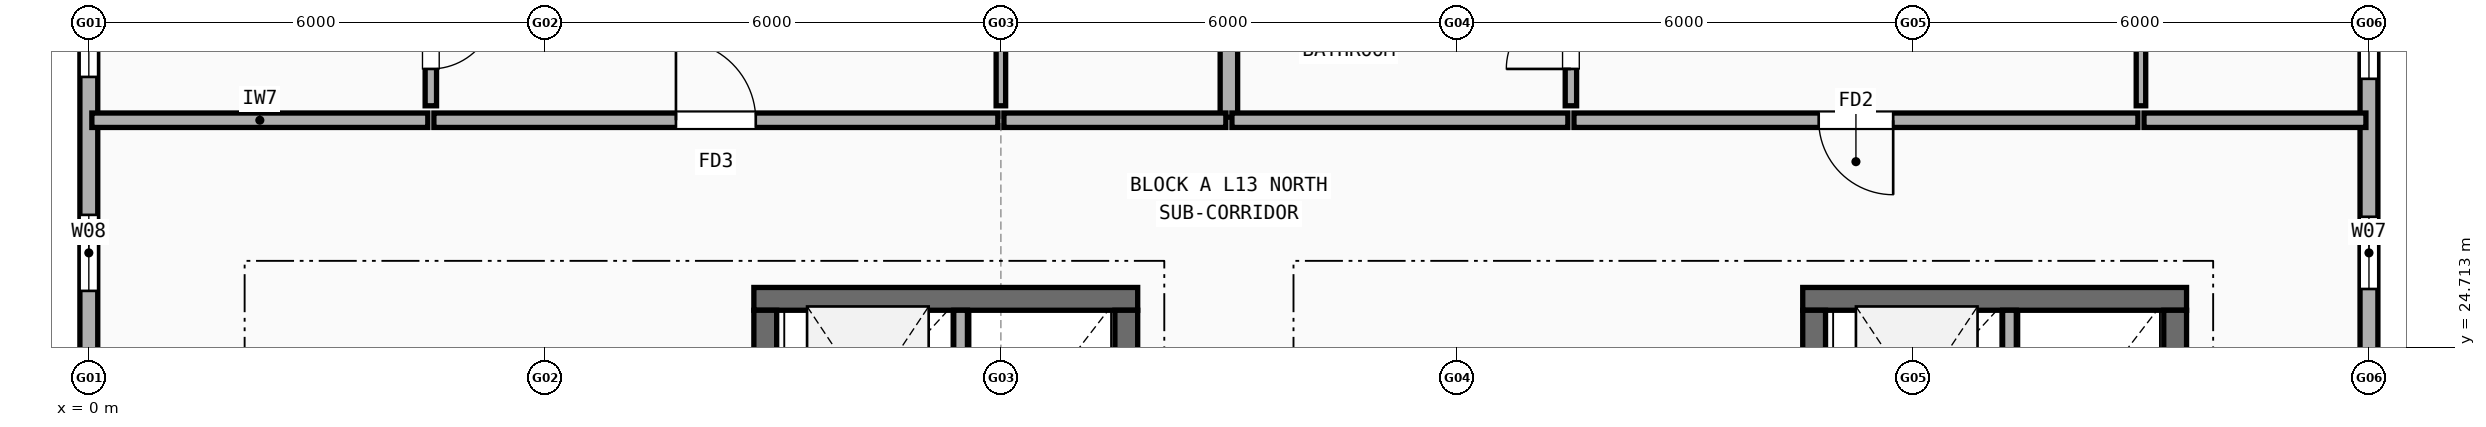
"""IFC4 building model, lengths in metres.
Left out: names, types, materials, properties, quantities, classifications, styles, units other than length and angle.
Written with IfcOpenShell. Run it as: python <this file> out.ifc"""

import sys

from ifc_helpers import new_model, si_unit, direction, frame, frame_2d, origin, place, context, subcontext, project, spatial, rectangle, extrude, element, fill, save


model = new_model("IFC4")
c1 = context("Model", 3, precision=1e-05, world=origin(), true_north=direction((0.0, 1.0)))
c2 = subcontext(c1, "Body", "Model", "MODEL_VIEW")
j1 = project(units=[si_unit("LENGTHUNIT", "METRE"), si_unit("PLANEANGLEUNIT", "RADIAN")], contexts=[c1])
p1 = place(None, origin())
s1 = spatial("IfcSite", under=j1, at=p1, CompositionType="ELEMENT")
p2 = place(p1, origin())
s2 = spatial("IfcBuilding", under=s1, at=p2, CompositionType="ELEMENT")
p3 = place(p2, frame((0.0, 0.0, 42.9)))
s3 = spatial("IfcBuildingStorey", under=s2, at=p3, CompositionType="ELEMENT", Elevation=42.9)
p4 = place(p3, frame((30.0, 24.25, 0.0), z_axis=(0.0, 0.0, 1.0), x_axis=(0.0, 1.0, 0.0)))
e1 = element("IfcWall", 1, at=p4, inside=s3, PredefinedType="STANDARD", context=c2, shape_type="SweptSolid", body=[
    extrude(rectangle(XDim=5.5, YDim=0.235, at=frame_2d((2.75, 0.0))), origin(), (0.0, 0.0, 1.0), 2.487),
])
p5 = place(p4, frame((1.23, 0.0, 0.9)))
e2 = element("IfcOpeningElement", 2, at=p5, cuts=e1, PredefinedType="OPENING", context=c2, shape_type="SweptSolid", body=[
    extrude(rectangle(XDim=0.95, YDim=1.35, at=frame_2d((0.475, 0.675))), frame((0.0, 0.127, 0.0), z_axis=(0.0, -1.0, 0.0), x_axis=(1.0, 0.0, 0.0)), (0.0, 0.0, 1.0), 0.255),
])
p6 = place(p4, frame((3.995, 0.0, 0.9)))
e3 = element("IfcOpeningElement", 3, at=p6, cuts=e1, PredefinedType="OPENING", context=c2, shape_type="SweptSolid", body=[
    extrude(rectangle(XDim=1.0, YDim=1.4, at=frame_2d((0.5, 0.7))), frame((0.0, 0.127, 0.0), z_axis=(0.0, -1.0, 0.0), x_axis=(1.0, 0.0, 0.0)), (0.0, 0.0, 1.0), 0.255),
])
p7 = place(p3, frame((0.0, 29.75, 0.0), z_axis=(0.0, 0.0, 1.0), x_axis=(0.0, -1.0, 0.0)))
e4 = element("IfcWall", 4, at=p7, inside=s3, PredefinedType="STANDARD", context=c2, shape_type="SweptSolid", body=[
    extrude(rectangle(XDim=5.5, YDim=0.235, at=frame_2d((2.75, 0.0))), origin(), (0.0, 0.0, 1.0), 2.487),
])
p8 = place(p7, frame((0.53, 0.0, 0.9)))
e5 = element("IfcOpeningElement", 5, at=p8, cuts=e4, PredefinedType="OPENING", context=c2, shape_type="SweptSolid", body=[
    extrude(rectangle(XDim=0.95, YDim=1.35, at=frame_2d((0.475, 0.675))), frame((0.0, 0.127, 0.0), z_axis=(0.0, -1.0, 0.0), x_axis=(1.0, 0.0, 0.0)), (0.0, 0.0, 1.0), 0.255),
])
p9 = place(p7, frame((3.295, 0.0, 0.9)))
e6 = element("IfcOpeningElement", 6, at=p9, cuts=e4, PredefinedType="OPENING", context=c2, shape_type="SweptSolid", body=[
    extrude(rectangle(XDim=1.0, YDim=1.4, at=frame_2d((0.5, 0.7))), frame((0.0, 0.127, 0.0), z_axis=(0.0, -1.0, 0.0), x_axis=(1.0, 0.0, 0.0)), (0.0, 0.0, 1.0), 0.255),
])
p10 = place(p3, frame((13.8, 25.35, 0.0), z_axis=(0.0, 0.0, 1.0), x_axis=(-1.0, 0.0, 0.0)))
e7 = element("IfcWall", 7, at=p10, inside=s3, PredefinedType="SHEAR", context=c2, shape_type="SweptSolid", body=[
    extrude(rectangle(XDim=5.05, YDim=0.3, at=frame_2d((2.525, 0.0))), origin(), (0.0, 0.0, 1.0), 3.005),
])
p11 = place(p3, frame((13.65, 18.75, 0.0), z_axis=(0.0, 0.0, 1.0), x_axis=(0.0, 1.0, 0.0)))
e8 = element("IfcWall", 8, at=p11, inside=s3, PredefinedType="SHEAR", context=c2, shape_type="SweptSolid", body=[
    extrude(rectangle(XDim=6.45, YDim=0.3, at=frame_2d((3.225, 0.0))), origin(), (0.0, 0.0, 1.0), 3.005),
])
p12 = place(p3, frame((8.9, 21.75, 0.0), z_axis=(0.0, 0.0, 1.0), x_axis=(0.0, 1.0, 0.0)))
e9 = element("IfcWall", 9, at=p12, inside=s3, PredefinedType="SHEAR", context=c2, shape_type="SweptSolid", body=[
    extrude(rectangle(XDim=3.45, YDim=0.3, at=frame_2d((1.725, 0.0))), origin(), (0.0, 0.0, 1.0), 3.005),
])
p13 = place(p3, frame((11.47, 22.94, 0.0), z_axis=(0.0, 0.0, 1.0), x_axis=(0.0, 1.0, 0.0)))
e10 = element("IfcWall", 10, at=p13, inside=s3, PredefinedType="SOLIDWALL", context=c2, shape_type="SweptSolid", body=[
    extrude(rectangle(XDim=2.26, YDim=0.18, at=frame_2d((1.13, 0.0))), origin(), (0.0, 0.0, 1.0), 3.005),
])
p14 = place(p3, frame((27.6, 25.35, 0.0), z_axis=(0.0, 0.0, 1.0), x_axis=(-1.0, 0.0, 0.0)))
e11 = element("IfcWall", 11, at=p14, inside=s3, PredefinedType="SHEAR", context=c2, shape_type="SweptSolid", body=[
    extrude(rectangle(XDim=5.05, YDim=0.3, at=frame_2d((2.525, 0.0))), origin(), (0.0, 0.0, 1.0), 3.005),
])
p15 = place(p3, frame((27.45, 18.75, 0.0), z_axis=(0.0, 0.0, 1.0), x_axis=(0.0, 1.0, 0.0)))
e12 = element("IfcWall", 12, at=p15, inside=s3, PredefinedType="SHEAR", context=c2, shape_type="SweptSolid", body=[
    extrude(rectangle(XDim=6.45, YDim=0.3, at=frame_2d((3.225, 0.0))), origin(), (0.0, 0.0, 1.0), 3.005),
])
p16 = place(p3, frame((22.7, 21.75, 0.0), z_axis=(0.0, 0.0, 1.0), x_axis=(0.0, 1.0, 0.0)))
e13 = element("IfcWall", 13, at=p16, inside=s3, PredefinedType="SHEAR", context=c2, shape_type="SweptSolid", body=[
    extrude(rectangle(XDim=3.45, YDim=0.3, at=frame_2d((1.725, 0.0))), origin(), (0.0, 0.0, 1.0), 3.005),
])
p17 = place(p3, frame((25.27, 22.94, 0.0), z_axis=(0.0, 0.0, 1.0), x_axis=(0.0, 1.0, 0.0)))
e14 = element("IfcWall", 14, at=p17, inside=s3, PredefinedType="SOLIDWALL", context=c2, shape_type="SweptSolid", body=[
    extrude(rectangle(XDim=2.26, YDim=0.18, at=frame_2d((1.13, 0.0))), origin(), (0.0, 0.0, 1.0), 3.005),
])
p18 = place(p3, frame((15.0, 27.74, 0.0), z_axis=(0.0, 0.0, 1.0), x_axis=(0.0, 1.0, 0.0)))
e15 = element("IfcWall", 15, at=p18, inside=s3, PredefinedType="SOLIDWALL", context=c2, shape_type="SweptSolid", body=[
    extrude(rectangle(XDim=7.87, YDim=0.23, at=frame_2d((3.935, 0.0))), origin(), (0.0, 0.0, 1.0), 2.537),
])
p19 = place(p3, frame((0.04, 27.7, 0.0), z_axis=(0.0, 0.0, 1.0), x_axis=(1.0, 0.0, 0.0)))
e16 = element("IfcWall", 16, at=p19, inside=s3, PredefinedType="SOLIDWALL", context=c2, shape_type="SweptSolid", body=[
    extrude(rectangle(XDim=4.42, YDim=0.19, at=frame_2d((2.21, 0.0))), origin(), (0.0, 0.0, 1.0), 2.487),
])
p20 = place(p3, frame((4.54, 27.7, 0.0), z_axis=(0.0, 0.0, 1.0), x_axis=(1.0, 0.0, 0.0)))
e17 = element("IfcWall", 17, at=p20, inside=s3, PredefinedType="SOLIDWALL", context=c2, shape_type="SweptSolid", body=[
    extrude(rectangle(XDim=7.42, YDim=0.19, at=frame_2d((3.71, 0.0))), origin(), (0.0, 0.0, 1.0), 2.508),
])
p21 = place(p20, frame((3.185, 0.0, 0.0)))
e18 = element("IfcOpeningElement", 18, at=p21, cuts=e17, PredefinedType="OPENING", context=c2, shape_type="SweptSolid", body=[
    extrude(rectangle(XDim=1.05, YDim=2.15, at=frame_2d((0.525, 1.075))), frame((0.0, 0.105, 0.0), z_axis=(0.0, -1.0, 0.0), x_axis=(1.0, 0.0, 0.0)), (0.0, 0.0, 1.0), 0.21),
])
p22 = place(p3, frame((4.5, 27.89, 0.0), z_axis=(0.0, 0.0, 1.0), x_axis=(0.0, 1.0, 0.0)))
e19 = element("IfcWall", 19, at=p22, inside=s3, PredefinedType="PARTITIONING", context=c2, shape_type="SweptSolid", body=[
    extrude(rectangle(XDim=1.82, YDim=0.15, at=frame_2d((0.91, 0.0))), origin(), (0.0, 0.0, 1.0), 3.005),
])
p23 = place(p22, frame((0.485, 0.0, 0.0)))
e20 = element("IfcOpeningElement", 20, at=p23, cuts=e19, PredefinedType="OPENING", context=c2, shape_type="SweptSolid", body=[
    extrude(rectangle(XDim=0.85, YDim=2.1, at=frame_2d((0.425, 1.05))), frame((0.0, 0.085, 0.0), z_axis=(0.0, -1.0, 0.0), x_axis=(1.0, 0.0, 0.0)), (0.0, 0.0, 1.0), 0.17),
])
p24 = place(p3, frame((12.04, 27.7, 0.0), z_axis=(0.0, 0.0, 1.0), x_axis=(1.0, 0.0, 0.0)))
e21 = element("IfcWall", 21, at=p24, inside=s3, PredefinedType="SOLIDWALL", context=c2, shape_type="SweptSolid", body=[
    extrude(rectangle(XDim=2.92, YDim=0.19, at=frame_2d((1.46, 0.0))), origin(), (0.0, 0.0, 1.0), 2.508),
])
p25 = place(p3, frame((12.0, 27.89, 0.0), z_axis=(0.0, 0.0, 1.0), x_axis=(0.0, 1.0, 0.0)))
e22 = element("IfcWall", 22, at=p25, inside=s3, PredefinedType="PARTITIONING", context=c2, shape_type="SweptSolid", body=[
    extrude(rectangle(XDim=7.6, YDim=0.125, at=frame_2d((3.8, 0.0))), origin(), (0.0, 0.0, 1.0), 2.508),
])
p26 = place(p25, frame((3.65, 0.0, 0.0)))
e23 = element("IfcOpeningElement", 23, at=p26, cuts=e22, PredefinedType="OPENING", context=c2, shape_type="SweptSolid", body=[
    extrude(rectangle(XDim=0.88, YDim=2.1, at=frame_2d((0.44, 1.05))), frame((0.0, 0.073, 0.0), z_axis=(0.0, -1.0, 0.0), x_axis=(1.0, 0.0, 0.0)), (0.0, 0.0, 1.0), 0.145),
])
p27 = place(p3, frame((15.04, 27.7, 0.0), z_axis=(0.0, 0.0, 1.0), x_axis=(1.0, 0.0, 0.0)))
e24 = element("IfcWall", 24, at=p27, inside=s3, PredefinedType="SOLIDWALL", context=c2, shape_type="SweptSolid", body=[
    extrude(rectangle(XDim=4.42, YDim=0.19, at=frame_2d((2.21, 0.0))), origin(), (0.0, 0.0, 1.0), 3.005),
])
p28 = place(p3, frame((19.54, 27.7, 0.0), z_axis=(0.0, 0.0, 1.0), x_axis=(1.0, 0.0, 0.0)))
e25 = element("IfcWall", 25, at=p28, inside=s3, PredefinedType="SOLIDWALL", context=c2, shape_type="SweptSolid", body=[
    extrude(rectangle(XDim=7.42, YDim=0.19, at=frame_2d((3.71, 0.0))), origin(), (0.0, 0.0, 1.0), 3.005),
])
p29 = place(p28, frame((3.22, 0.0, 0.0)))
e26 = element("IfcOpeningElement", 26, at=p29, cuts=e25, PredefinedType="OPENING", context=c2, shape_type="SweptSolid", body=[
    extrude(rectangle(XDim=0.98, YDim=2.15, at=frame_2d((0.49, 1.075))), frame((0.0, 0.105, 0.0), z_axis=(0.0, -1.0, 0.0), x_axis=(1.0, 0.0, 0.0)), (0.0, 0.0, 1.0), 0.21),
])
p30 = place(p3, frame((19.5, 27.89, 0.0), z_axis=(0.0, 0.0, 1.0), x_axis=(0.0, 1.0, 0.0)))
e27 = element("IfcWall", 27, at=p30, inside=s3, PredefinedType="PARTITIONING", context=c2, shape_type="SweptSolid", body=[
    extrude(rectangle(XDim=1.82, YDim=0.15, at=frame_2d((0.91, 0.0))), origin(), (0.0, 0.0, 1.0), 3.005),
])
p31 = place(p30, frame((0.485, 0.0, 0.0)))
e28 = element("IfcOpeningElement", 28, at=p31, cuts=e27, PredefinedType="OPENING", context=c2, shape_type="SweptSolid", body=[
    extrude(rectangle(XDim=0.85, YDim=2.1, at=frame_2d((0.425, 1.05))), frame((0.0, 0.085, 0.0), z_axis=(0.0, -1.0, 0.0), x_axis=(1.0, 0.0, 0.0)), (0.0, 0.0, 1.0), 0.17),
])
p32 = place(p3, frame((27.04, 27.7, 0.0), z_axis=(0.0, 0.0, 1.0), x_axis=(1.0, 0.0, 0.0)))
e29 = element("IfcWall", 29, at=p32, inside=s3, PredefinedType="SOLIDWALL", context=c2, shape_type="SweptSolid", body=[
    extrude(rectangle(XDim=2.92, YDim=0.19, at=frame_2d((1.46, 0.0))), origin(), (0.0, 0.0, 1.0), 2.487),
])
p33 = place(p3, frame((27.0, 27.89, 0.0), z_axis=(0.0, 0.0, 1.0), x_axis=(0.0, 1.0, 0.0)))
e30 = element("IfcWall", 30, at=p33, inside=s3, PredefinedType="PARTITIONING", context=c2, shape_type="SweptSolid", body=[
    extrude(rectangle(XDim=7.92, YDim=0.125, at=frame_2d((3.96, 0.0))), origin(), (0.0, 0.0, 1.0), 2.537),
])
p34 = place(p33, frame((3.65, 0.0, 0.0)))
e31 = element("IfcOpeningElement", 31, at=p34, cuts=e30, PredefinedType="OPENING", context=c2, shape_type="SweptSolid", body=[
    extrude(rectangle(XDim=0.9, YDim=2.1, at=frame_2d((0.45, 1.05))), frame((0.0, 0.073, 0.0), z_axis=(0.0, -1.0, 0.0), x_axis=(1.0, 0.0, 0.0)), (0.0, 0.0, 1.0), 0.145),
])
p35 = place(p5, origin())
e32 = element("IfcWindow", 32, at=p35, inside=s3, PartitioningType="SINGLE_PANEL", PredefinedType="WINDOW", context=c2, shape_type="SweptSolid", body=[
    extrude(rectangle(XDim=0.95, YDim=1.35, at=frame_2d((0.475, 0.675))), frame((0.0, 0.03, 0.0), z_axis=(0.0, -1.0, 0.0), x_axis=(1.0, 0.0, 0.0)), (0.0, 0.0, 1.0), 0.06),
])
fill(e2, e32)
p36 = place(p6, origin())
e33 = element("IfcWindow", 33, at=p36, inside=s3, PartitioningType="SINGLE_PANEL", PredefinedType="WINDOW", context=c2, shape_type="SweptSolid", body=[
    extrude(rectangle(XDim=1.0, YDim=1.4, at=frame_2d((0.5, 0.7))), frame((0.0, 0.03, 0.0), z_axis=(0.0, -1.0, 0.0), x_axis=(1.0, 0.0, 0.0)), (0.0, 0.0, 1.0), 0.06),
])
fill(e3, e33)
p37 = place(p8, origin())
e34 = element("IfcWindow", 34, at=p37, inside=s3, PartitioningType="SINGLE_PANEL", PredefinedType="WINDOW", context=c2, shape_type="SweptSolid", body=[
    extrude(rectangle(XDim=0.95, YDim=1.35, at=frame_2d((0.475, 0.675))), frame((0.0, 0.03, 0.0), z_axis=(0.0, -1.0, 0.0), x_axis=(1.0, 0.0, 0.0)), (0.0, 0.0, 1.0), 0.06),
])
fill(e5, e34)
p38 = place(p9, origin())
e35 = element("IfcWindow", 35, at=p38, inside=s3, PartitioningType="SINGLE_PANEL", PredefinedType="WINDOW", context=c2, shape_type="SweptSolid", body=[
    extrude(rectangle(XDim=1.0, YDim=1.4, at=frame_2d((0.5, 0.7))), frame((0.0, 0.03, 0.0), z_axis=(0.0, -1.0, 0.0), x_axis=(1.0, 0.0, 0.0)), (0.0, 0.0, 1.0), 0.06),
])
fill(e6, e35)
p39 = place(p21, origin())
e36 = element("IfcDoor", 36, at=p39, inside=s3, OperationType="SINGLE_SWING_LEFT", PredefinedType="DOOR", context=c2, shape_type="SweptSolid", body=[
    extrude(rectangle(XDim=1.05, YDim=2.15, at=frame_2d((0.525, 1.075))), frame((0.0, 0.025, 0.0), z_axis=(0.0, -1.0, 0.0), x_axis=(1.0, 0.0, 0.0)), (0.0, 0.0, 1.0), 0.05),
])
fill(e18, e36)
p40 = place(p23, origin())
e37 = element("IfcDoor", 37, at=p40, inside=s3, OperationType="SINGLE_SWING_RIGHT", PredefinedType="DOOR", context=c2, shape_type="SweptSolid", body=[
    extrude(rectangle(XDim=0.85, YDim=2.1, at=frame_2d((0.425, 1.05))), frame((0.0, 0.025, 0.0), z_axis=(0.0, -1.0, 0.0), x_axis=(1.0, 0.0, 0.0)), (0.0, 0.0, 1.0), 0.05),
])
fill(e20, e37)
p41 = place(p29, origin())
e38 = element("IfcDoor", 38, at=p41, inside=s3, OperationType="SINGLE_SWING_RIGHT", PredefinedType="DOOR", context=c2, shape_type="SweptSolid", body=[
    extrude(rectangle(XDim=0.98, YDim=2.15, at=frame_2d((0.49, 1.075))), frame((0.0, 0.025, 0.0), z_axis=(0.0, -1.0, 0.0), x_axis=(1.0, 0.0, 0.0)), (0.0, 0.0, 1.0), 0.05),
])
fill(e26, e38)
p42 = place(p31, origin())
e39 = element("IfcDoor", 39, at=p42, inside=s3, OperationType="SINGLE_SWING_LEFT", PredefinedType="DOOR", context=c2, shape_type="SweptSolid", body=[
    extrude(rectangle(XDim=0.85, YDim=2.1, at=frame_2d((0.425, 1.05))), frame((0.0, 0.025, 0.0), z_axis=(0.0, -1.0, 0.0), x_axis=(1.0, 0.0, 0.0)), (0.0, 0.0, 1.0), 0.05),
])
fill(e28, e39)
save(model, sys.argv[1])
